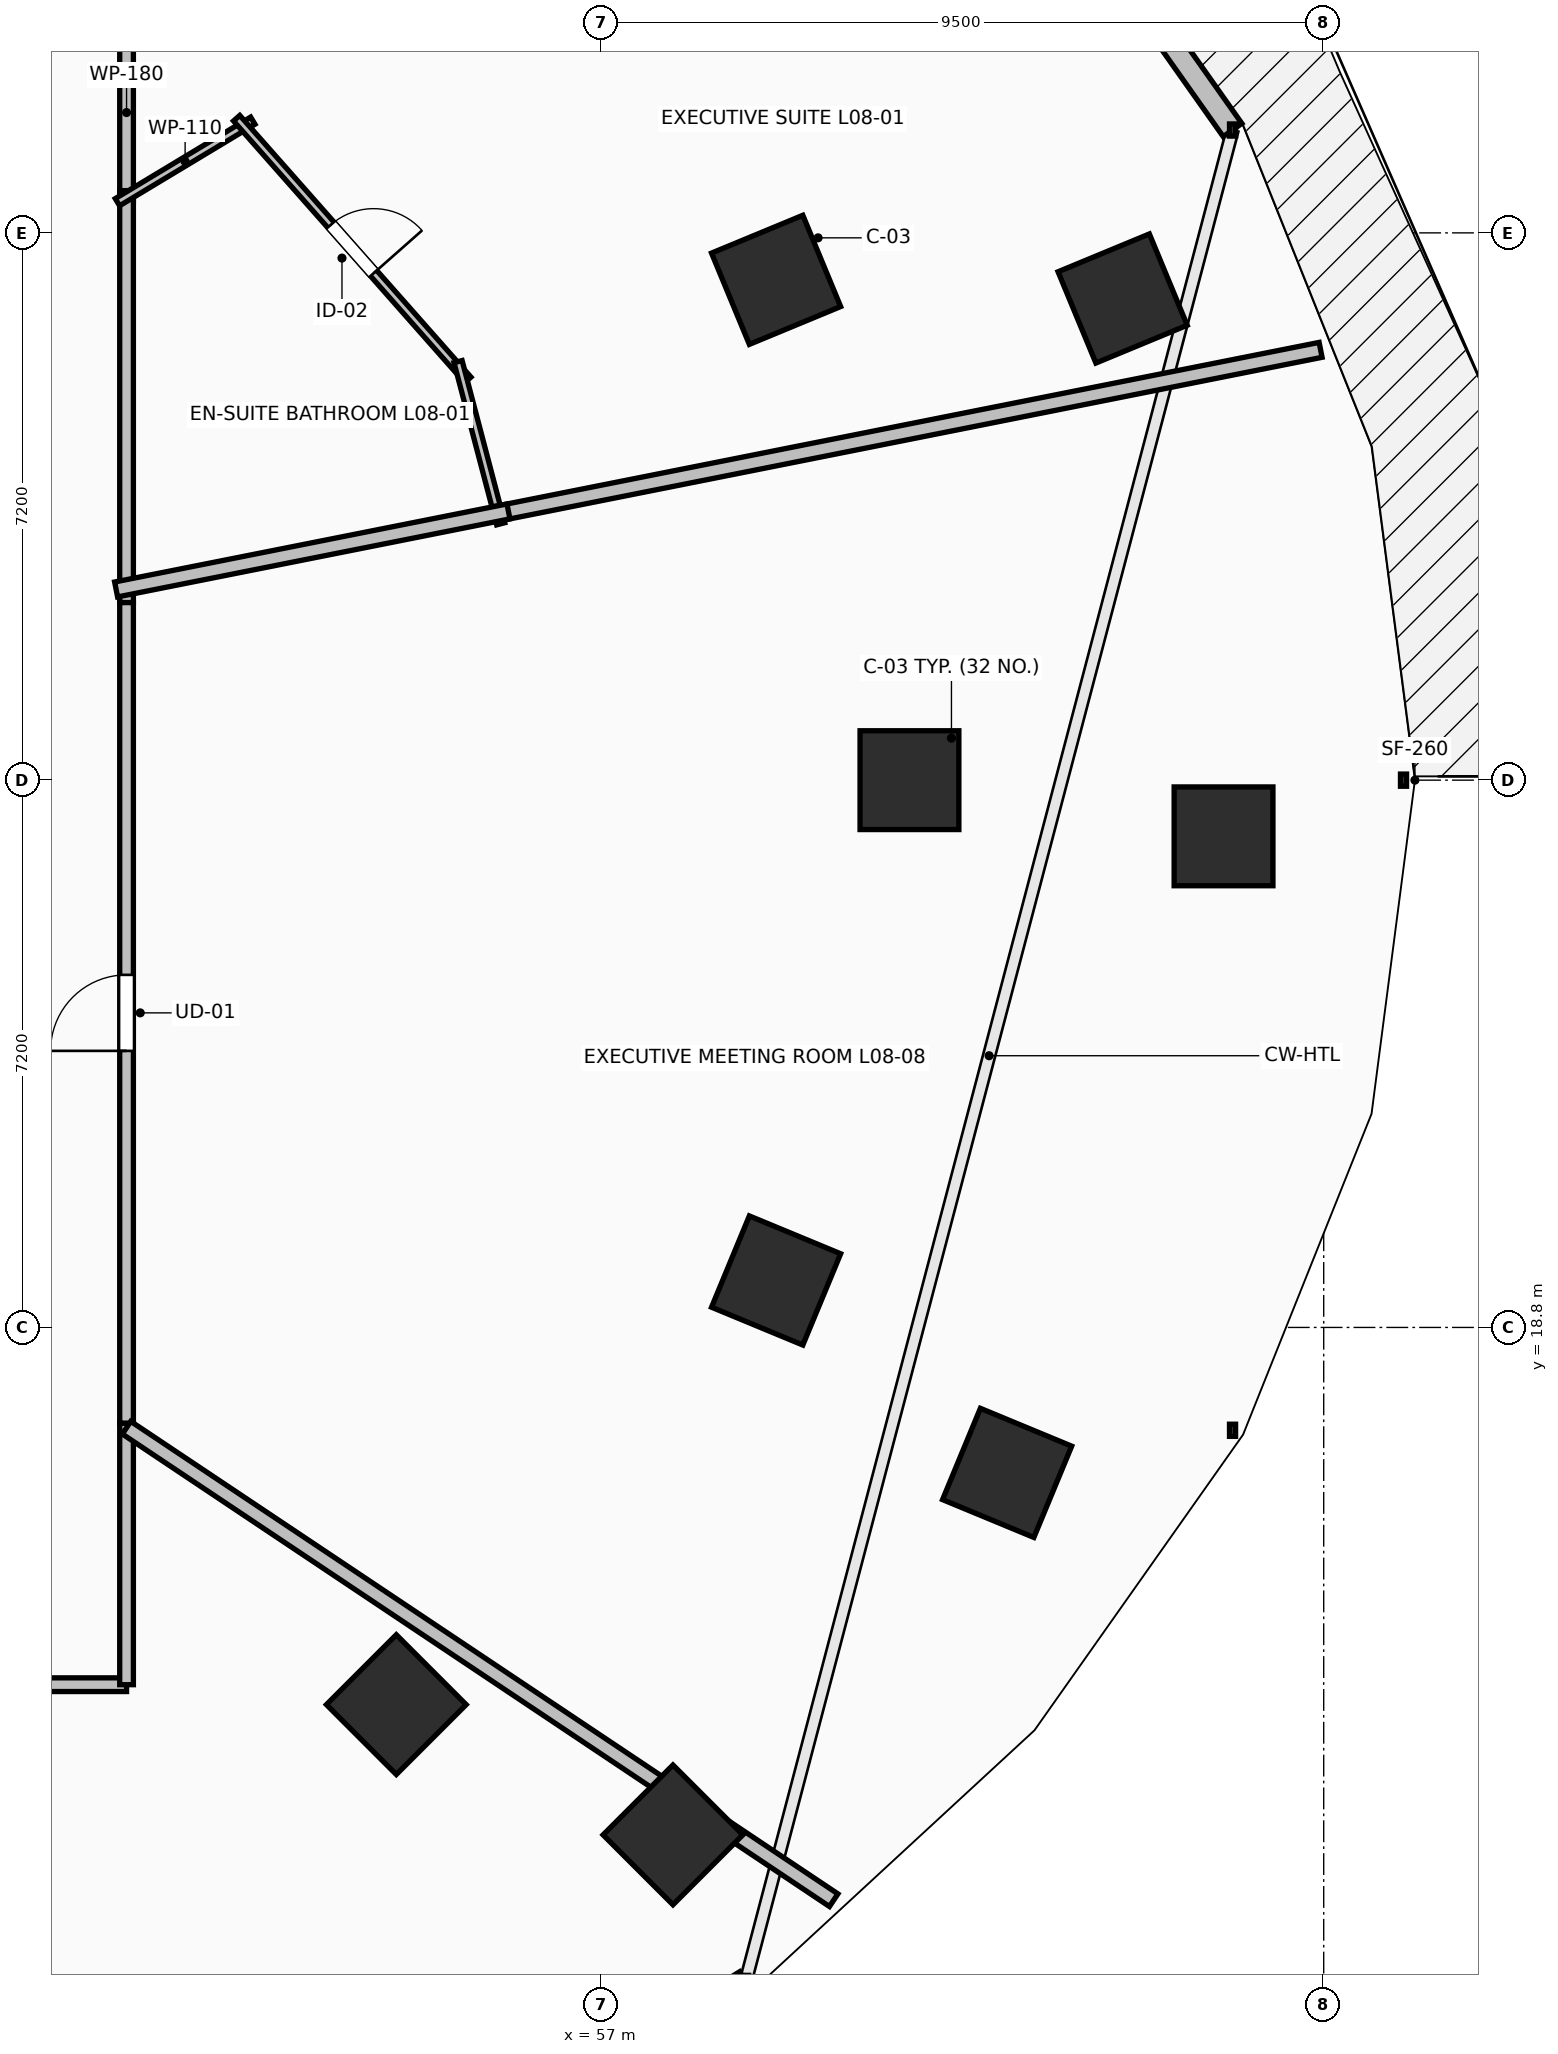
"""IFC4 building model, lengths in metres.
Left out: names, types, materials, properties, quantities, classifications, styles, units other than length and angle.
Written with IfcOpenShell. Run it as: python <this file> out.ifc"""

import sys

from ifc_helpers import new_model, si_unit, direction, frame, frame_2d, origin, origin_2d, place, context, subcontext, project, spatial, rectangle, extrude, element, fill, save


model = new_model("IFC4")
c1 = context("Model", 3, precision=1e-05, world=origin(), true_north=direction((0.0, 1.0)))
c2 = subcontext(c1, "Body", "Model", "MODEL_VIEW")
j1 = project(units=[si_unit("LENGTHUNIT", "METRE"), si_unit("PLANEANGLEUNIT", "RADIAN")], contexts=[c1])
p1 = place(None, origin())
s1 = spatial("IfcSite", under=j1, at=p1, CompositionType="ELEMENT")
p2 = place(p1, origin())
s2 = spatial("IfcBuilding", under=s1, at=p2, CompositionType="ELEMENT")
p3 = place(p2, frame((0.0, 0.0, 34.5)))
s3 = spatial("IfcBuildingStorey", under=s2, at=p3, CompositionType="ELEMENT", Elevation=34.5)
for number, where, z_axis, x_axis in (
    (1, (61.05, 26.0, 0.0), (0.0, 0.0, 1.0), (1.0, 0.0, 0.0)),
    (2, (59.295, 32.582, 0.0), (0.0, 0.0, 1.0), (0.924, 0.383, 0.0)),
    (3, (54.299, 13.838, 0.0), (0.0, 0.0, 1.0), (0.707, -0.707, 0.0)),
    (4, (59.295, 19.418, 0.0), (0.0, 0.0, 1.0), (0.924, -0.383, 0.0)),
    (5, (65.182, 25.261, 0.0), (0.0, 0.0, 1.0), (1.0, 0.0, 0.0)),
    (6, (63.854, 32.337, 0.0), (0.0, 0.0, 1.0), (0.924, 0.383, 0.0)),
    (7, (57.939, 12.124, 0.0), (0.0, 0.0, 1.0), (0.707, -0.707, 0.0)),
    (8, (62.335, 16.886, 0.0), (0.0, 0.0, 1.0), (0.924, -0.383, 0.0)),
):
    element("IfcColumn", number, at=place(p3, frame(where, z_axis=z_axis, x_axis=x_axis)), inside=s3, PredefinedType="COLUMN", context=c2, shape_type="SweptSolid", body=[
        extrude(rectangle(XDim=1.3, YDim=1.3, at=origin_2d()), origin(), (0.0, 0.0, 1.0), 3.5),
    ])
p4 = place(p3, frame((65.301, 34.553, 0.0), z_axis=(0.0, 0.0, 1.0), x_axis=(-0.577130815624, 0.816651713803, 0.0)))
e9 = element("IfcWall", 9, at=p4, inside=s3, PredefinedType="STANDARD", context=c2, shape_type="SweptSolid", body=[
    extrude(rectangle(XDim=4.731, YDim=0.3, at=frame_2d((2.366, 0.0))), origin(), (0.0, 0.0, 1.0), 3.24),
])
p5 = place(p4, frame((1.566, 0.0, 0.0)))
e10 = element("IfcOpeningElement", 10, at=p5, cuts=e9, PredefinedType="OPENING", context=c2, shape_type="SweptSolid", body=[
    extrude(rectangle(XDim=1.6, YDim=2.3, at=frame_2d((0.8, 1.15))), frame((0.0, 0.165, 0.0), z_axis=(0.0, -1.0, 0.0), x_axis=(1.0, 0.0, 0.0)), (0.0, 0.0, 1.0), 0.33),
])
p6 = place(p3, frame((54.417, 7.417, 0.0), z_axis=(0.0, 0.0, 1.0), x_axis=(0.849633724826, 0.527373239404, 0.0)))
e11 = element("IfcWall", 11, at=p6, inside=s3, PredefinedType="STANDARD", context=c2, shape_type="SweptSolid", body=[
    extrude(rectangle(XDim=5.271, YDim=0.3, at=frame_2d((2.635, 0.0))), origin(), (0.0, 0.0, 1.0), 3.24),
])
p7 = place(p6, frame((1.885, 0.0, 0.85)))
e12 = element("IfcOpeningElement", 12, at=p7, cuts=e11, PredefinedType="OPENING", context=c2, shape_type="SweptSolid", body=[
    extrude(rectangle(XDim=1.5, YDim=2.19, at=frame_2d((0.75, 1.095))), frame((0.0, 0.165, 0.0), z_axis=(0.0, -1.0, 0.0), x_axis=(1.0, 0.0, 0.0)), (0.0, 0.0, 1.0), 0.33),
])
p8 = place(p3, frame((50.75, 33.616, 0.0), z_axis=(0.0, 0.0, 1.0), x_axis=(0.0, 1.0, 0.0)))
e13 = element("IfcWall", 13, at=p8, inside=s3, PredefinedType="PARTITIONING", context=c2, shape_type="SweptSolid", body=[
    extrude(rectangle(XDim=2.334, YDim=0.18, at=frame_2d((1.167, 0.0))), origin(), (0.0, 0.0, 1.0), 2.432),
])
p9 = place(p3, frame((50.75, 28.336, 0.0), z_axis=(0.0, 0.0, 1.0), x_axis=(0.0, 1.0, 0.0)))
e14 = element("IfcWall", 14, at=p9, inside=s3, PredefinedType="PARTITIONING", context=c2, shape_type="SweptSolid", body=[
    extrude(rectangle(XDim=5.42, YDim=0.18, at=frame_2d((2.71, 0.0))), origin(), (0.0, 0.0, 1.0), 2.432),
])
p10 = place(p3, frame((42.34, 14.1, 0.0), z_axis=(0.0, 0.0, 1.0), x_axis=(1.0, 0.0, 0.0)))
e15 = element("IfcWall", 15, at=p10, inside=s3, PredefinedType="PARTITIONING", context=c2, shape_type="SweptSolid", body=[
    extrude(rectangle(XDim=8.41, YDim=0.18, at=frame_2d((4.205, 0.0))), origin(), (0.0, 0.0, 1.0), 2.432),
])
p11 = place(p10, frame((3.705, 0.0, 0.0)))
e16 = element("IfcOpeningElement", 16, at=p11, cuts=e15, PredefinedType="OPENING", context=c2, shape_type="SweptSolid", body=[
    extrude(rectangle(XDim=1.0, YDim=2.15, at=frame_2d((0.5, 1.075))), frame((0.0, 0.105, 0.0), z_axis=(0.0, -1.0, 0.0), x_axis=(1.0, 0.0, 0.0)), (0.0, 0.0, 1.0), 0.21),
])
p12 = place(p3, frame((50.75, 14.1, 0.0), z_axis=(0.0, 0.0, 1.0), x_axis=(0.0, 1.0, 0.0)))
e17 = element("IfcWall", 17, at=p12, inside=s3, PredefinedType="PARTITIONING", context=c2, shape_type="SweptSolid", body=[
    extrude(rectangle(XDim=3.441, YDim=0.18, at=frame_2d((1.72, 0.0))), origin(), (0.0, 0.0, 1.0), 2.432),
])
p13 = place(p3, frame((50.75, 17.541, 0.0), z_axis=(0.0, 0.0, 1.0), x_axis=(0.0, 1.0, 0.0)))
e18 = element("IfcWall", 18, at=p13, inside=s3, PredefinedType="PARTITIONING", context=c2, shape_type="SweptSolid", body=[
    extrude(rectangle(XDim=10.795, YDim=0.18, at=frame_2d((5.397, 0.0))), origin(), (0.0, 0.0, 1.0), 2.432),
])
p14 = place(p13, frame((4.897, 0.0, 0.0)))
e19 = element("IfcOpeningElement", 19, at=p14, cuts=e18, PredefinedType="OPENING", context=c2, shape_type="SweptSolid", body=[
    extrude(rectangle(XDim=1.0, YDim=2.15, at=frame_2d((0.5, 1.075))), frame((0.0, 0.105, 0.0), z_axis=(0.0, -1.0, 0.0), x_axis=(1.0, 0.0, 0.0)), (0.0, 0.0, 1.0), 0.21),
])
p15 = place(p3, frame((50.63, 33.604, 0.0), z_axis=(0.0, 0.0, 1.0), x_axis=(0.856631627837, 0.515928535932, 0.0)))
e20 = element("IfcWall", 20, at=p15, inside=s3, PredefinedType="PARTITIONING", context=c2, shape_type="SweptSolid", body=[
    extrude(rectangle(XDim=2.079, YDim=0.11, at=frame_2d((1.04, 0.0))), origin(), (0.0, 0.0, 1.0), 3.24),
])
p16 = place(p3, frame((52.198, 34.709, 0.0), z_axis=(0.0, 0.0, 1.0), x_axis=(0.662071486681, -0.74944068913, 0.0)))
e21 = element("IfcWall", 21, at=p16, inside=s3, PredefinedType="PARTITIONING", context=c2, shape_type="SweptSolid", body=[
    extrude(rectangle(XDim=4.594, YDim=0.11, at=frame_2d((2.297, 0.0))), origin(), (0.0, 0.0, 1.0), 2.432),
])
p17 = place(p16, frame((1.872, 0.0, 0.0)))
e22 = element("IfcOpeningElement", 22, at=p17, cuts=e21, PredefinedType="OPENING", context=c2, shape_type="SweptSolid", body=[
    extrude(rectangle(XDim=0.85, YDim=2.1, at=frame_2d((0.425, 1.05))), frame((0.0, 0.07, 0.0), z_axis=(0.0, -1.0, 0.0), x_axis=(1.0, 0.0, 0.0)), (0.0, 0.0, 1.0), 0.14),
])
p18 = place(p3, frame((55.111, 31.506, 0.0), z_axis=(0.0, 0.0, 1.0), x_axis=(0.254389812051, -0.967101764823, 0.0)))
e23 = element("IfcWall", 23, at=p18, inside=s3, PredefinedType="PARTITIONING", context=c2, shape_type="SweptSolid", body=[
    extrude(rectangle(XDim=2.206, YDim=0.11, at=frame_2d((1.103, 0.0))), origin(), (0.0, 0.0, 1.0), 3.24),
])
p19 = place(p3, frame((55.637, 29.508, 0.0), z_axis=(0.0, 0.0, 1.0), x_axis=(0.980781844691, 0.195107593712, 0.0)))
e24 = element("IfcWall", 24, at=p19, inside=s3, PredefinedType="PARTITIONING", context=c2, shape_type="SweptSolid", body=[
    extrude(rectangle(XDim=11.034, YDim=0.2, at=frame_2d((5.517, 0.0))), origin(), (0.0, 0.0, 1.0), 2.624),
])
p20 = place(p3, frame((50.613, 28.509, 0.0), z_axis=(0.0, 0.0, 1.0), x_axis=(0.980788877604, 0.195072236795, 0.0)))
e25 = element("IfcWall", 25, at=p20, inside=s3, PredefinedType="PARTITIONING", context=c2, shape_type="SweptSolid", body=[
    extrude(rectangle(XDim=5.263, YDim=0.2, at=frame_2d((2.631, 0.0))), origin(), (0.0, 0.0, 1.0), 2.972),
])
p21 = place(p3, frame((60.053, 11.265, 0.0), z_axis=(0.0, 0.0, 1.0), x_axis=(-0.831469078055, 0.555571032577, 0.0)))
e26 = element("IfcWall", 26, at=p21, inside=s3, PredefinedType="PARTITIONING", context=c2, shape_type="SweptSolid", body=[
    extrude(rectangle(XDim=11.189, YDim=0.2, at=frame_2d((5.594, 0.0))), origin(), (0.0, 0.0, 1.0), 2.624),
])
p22 = place(p14, origin())
e27 = element("IfcDoor", 27, at=p22, inside=s3, OperationType="SINGLE_SWING_LEFT", PredefinedType="DOOR", context=c2, shape_type="SweptSolid", body=[
    extrude(rectangle(XDim=1.0, YDim=2.15, at=frame_2d((0.5, 1.075))), frame((0.0, 0.025, 0.0), z_axis=(0.0, -1.0, 0.0), x_axis=(1.0, 0.0, 0.0)), (0.0, 0.0, 1.0), 0.05),
])
fill(e19, e27)
p23 = place(p17, origin())
e28 = element("IfcDoor", 28, at=p23, inside=s3, OperationType="SINGLE_SWING_RIGHT", PredefinedType="DOOR", context=c2, shape_type="SweptSolid", body=[
    extrude(rectangle(XDim=0.85, YDim=2.1, at=frame_2d((0.425, 1.05))), frame((0.0, 0.025, 0.0), z_axis=(0.0, -1.0, 0.0), x_axis=(1.0, 0.0, 0.0)), (0.0, 0.0, 1.0), 0.05),
])
fill(e22, e28)
save(model, sys.argv[1])
